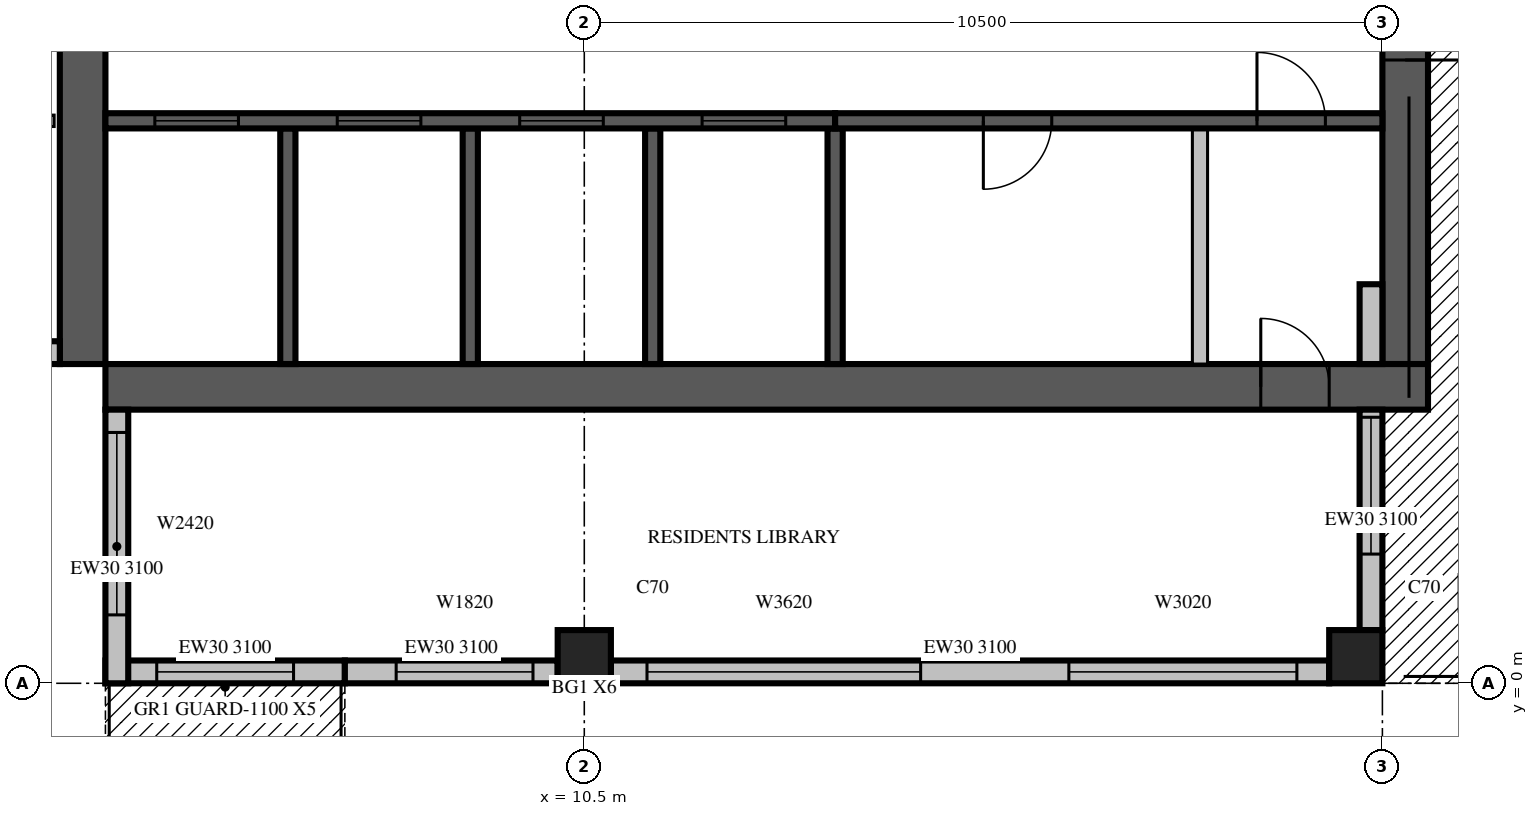
"""IFC4 building model, lengths in metres.
Left out: names, types, materials, properties, quantities, classifications, styles, units other than length and angle.
Written with IfcOpenShell. Run it as: python <this file> out.ifc"""

import sys

from ifc_helpers import new_model, si_unit, direction, frame, frame_2d, origin, origin_2d, place, context, subcontext, project, spatial, rectangle, extrude, source, transform, mapped, element, fill, save


model = new_model("IFC4")
c1 = context("Model", 3, precision=1e-05, world=origin(), true_north=direction((0.0, 1.0)))
c2 = subcontext(c1, "Body", "Model", "MODEL_VIEW")
j1 = project(units=[si_unit("LENGTHUNIT", "METRE"), si_unit("PLANEANGLEUNIT", "RADIAN")], contexts=[c1])
p1 = place(None, origin())
s1 = spatial("IfcSite", under=j1, at=p1, CompositionType="ELEMENT")
p2 = place(p1, origin())
s2 = spatial("IfcBuilding", under=s1, at=p2, CompositionType="ELEMENT")
p3 = place(p2, frame((0.0, 0.0, 291.5)))
s3 = spatial("IfcBuildingStorey", under=s2, at=p3, CompositionType="ELEMENT", Elevation=291.5)
m1 = source(origin(), c2, "Body", "SweptSolid", [
    extrude(rectangle(XDim=0.7, YDim=0.7, at=origin_2d()), origin(), (0.0, 0.0, 1.0), 3.5),
])
for number, where, z_axis, x_axis in (
    (1, (10.5, 0.35, 0.0), (0.0, 0.0, 1.0), (1.0, 0.0, 0.0)),
    (2, (20.65, 0.35, 0.0), (0.0, 0.0, 1.0), (1.0, 0.0, 0.0)),
):
    element("IfcColumn", number, at=place(p3, frame(where, z_axis=z_axis, x_axis=x_axis)), inside=s3, PredefinedType="COLUMN", context=c2, shape_type="MappedRepresentation", body=[
        mapped(m1, transform((0.0, 0.0, 0.0), scale=1.0)),
    ])
m2 = source(origin(), c2, "Body", "SweptSolid", [
    extrude(rectangle(XDim=17.4, YDim=0.6, at=frame_2d((8.7, 0.0))), origin(), (0.0, 0.0, 1.0), 3.5),
])
p4 = place(p3, frame((3.9, 4.2, 0.0), z_axis=(0.0, 0.0, 1.0), x_axis=(0.0, 1.0, 0.0)))
e3 = element("IfcWall", 3, at=p4, inside=s3, PredefinedType="SHEAR", context=c2, shape_type="MappedRepresentation", body=[
    mapped(m2, transform((0.0, 0.0, 0.0), scale=1.0)),
])
m3 = source(origin(), c2, "Body", "SweptSolid", [
    extrude(rectangle(XDim=2.2, YDim=2.1, at=frame_2d((1.1, 1.05))), frame((0.0, 0.31, 0.0), z_axis=(0.0, -1.0, 0.0), x_axis=(1.0, 0.0, 0.0)), (0.0, 0.0, 1.0), 0.62),
])
p5 = place(p4, frame((4.2, 0.0, 0.0)))
e4 = element("IfcOpeningElement", 4, at=p5, cuts=e3, PredefinedType="OPENING", context=c2, shape_type="MappedRepresentation", body=[
    mapped(m3, transform((0.0, 0.0, 0.0), scale=1.0)),
])
m4 = source(origin(), c2, "Body", "SweptSolid", [
    extrude(rectangle(XDim=0.9, YDim=2.1, at=frame_2d((0.45, 1.05))), frame((0.0, 0.31, 0.0), z_axis=(0.0, -1.0, 0.0), x_axis=(1.0, 0.0, 0.0)), (0.0, 0.0, 1.0), 0.62),
])
p6 = place(p4, frame((10.95, 0.0, 0.0)))
e5 = element("IfcOpeningElement", 5, at=p6, cuts=e3, PredefinedType="OPENING", context=c2, shape_type="MappedRepresentation", body=[
    mapped(m4, transform((0.0, 0.0, 0.0), scale=1.0)),
])
m5 = source(origin(), c2, "Body", "SweptSolid", [
    extrude(rectangle(XDim=6.3, YDim=0.6, at=frame_2d((3.15, 0.0))), origin(), (0.0, 0.0, 1.0), 3.5),
])
p7 = place(p3, frame((21.3, 4.2, 0.0), z_axis=(0.0, 0.0, 1.0), x_axis=(0.0, 1.0, 0.0)))
e6 = element("IfcWall", 6, at=p7, inside=s3, PredefinedType="SHEAR", context=c2, shape_type="MappedRepresentation", body=[
    mapped(m5, transform((0.0, 0.0, 0.0), scale=1.0)),
])
p8 = place(p7, frame((4.0, 0.0, 0.0)))
e7 = element("IfcOpeningElement", 7, at=p8, cuts=e6, PredefinedType="OPENING", context=c2, shape_type="MappedRepresentation", body=[
    mapped(m3, transform((0.0, 0.0, 0.0), scale=1.0)),
])
p9 = place(p3, frame((4.2, 3.9, 0.0), z_axis=(0.0, 0.0, 1.0), x_axis=(1.0, 0.0, 0.0)))
e8 = element("IfcWall", 8, at=p9, inside=s3, PredefinedType="SHEAR", context=c2, shape_type="MappedRepresentation", body=[
    mapped(m2, transform((0.0, 0.0, 0.0), scale=1.0)),
])
p10 = place(p9, frame((15.2, 0.0, 0.0)))
e9 = element("IfcOpeningElement", 9, at=p10, cuts=e8, PredefinedType="OPENING", context=c2, shape_type="MappedRepresentation", body=[
    mapped(m4, transform((0.0, 0.0, 0.0), scale=1.0)),
])
m6 = source(origin(), c2, "Body", "SweptSolid", [
    extrude(rectangle(XDim=3.15, YDim=0.3, at=frame_2d((1.575, 0.0))), origin(), (0.0, 0.0, 1.0), 3.1),
])
p11 = place(p3, frame((4.2, 0.15, 0.0), z_axis=(0.0, 0.0, 1.0), x_axis=(1.0, 0.0, 0.0)))
e10 = element("IfcWall", 10, at=p11, inside=s3, PredefinedType="STANDARD", context=c2, shape_type="MappedRepresentation", body=[
    mapped(m6, transform((0.0, 0.0, 0.0), scale=1.0)),
])
m7 = source(origin(), c2, "Body", "SweptSolid", [
    extrude(rectangle(XDim=1.8, YDim=2.4, at=frame_2d((0.9, 1.2))), frame((0.0, 0.16, 0.0), z_axis=(0.0, -1.0, 0.0), x_axis=(1.0, 0.0, 0.0)), (0.0, 0.0, 1.0), 0.32),
])
p12 = place(p11, frame((0.675, 0.0, 0.0)))
e11 = element("IfcOpeningElement", 11, at=p12, cuts=e10, PredefinedType="OPENING", context=c2, shape_type="MappedRepresentation", body=[
    mapped(m7, transform((0.0, 0.0, 0.0), scale=1.0)),
])
m8 = source(origin(), c2, "Body", "SweptSolid", [
    extrude(rectangle(XDim=2.8, YDim=0.3, at=frame_2d((1.4, 0.0))), origin(), (0.0, 0.0, 1.0), 3.1),
])
p13 = place(p3, frame((7.35, 0.15, 0.0), z_axis=(0.0, 0.0, 1.0), x_axis=(1.0, 0.0, 0.0)))
e12 = element("IfcWall", 12, at=p13, inside=s3, PredefinedType="STANDARD", context=c2, shape_type="MappedRepresentation", body=[
    mapped(m8, transform((0.0, 0.0, 0.0), scale=1.0)),
])
m9 = source(origin(), c2, "Body", "SweptSolid", [
    extrude(rectangle(XDim=1.8, YDim=2.0, at=frame_2d((0.9, 1.0))), frame((0.0, 0.16, 0.0), z_axis=(0.0, -1.0, 0.0), x_axis=(1.0, 0.0, 0.0)), (0.0, 0.0, 1.0), 0.32),
])
p14 = place(p13, frame((0.675, 0.0, 0.6)))
e13 = element("IfcOpeningElement", 13, at=p14, cuts=e12, PredefinedType="OPENING", context=c2, shape_type="MappedRepresentation", body=[
    mapped(m9, transform((0.0, 0.0, 0.0), scale=1.0)),
])
m10 = source(origin(), c2, "Body", "SweptSolid", [
    extrude(rectangle(XDim=9.45, YDim=0.3, at=frame_2d((4.725, 0.0))), origin(), (0.0, 0.0, 1.0), 3.1),
])
p15 = place(p3, frame((10.85, 0.15, 0.0), z_axis=(0.0, 0.0, 1.0), x_axis=(1.0, 0.0, 0.0)))
e14 = element("IfcWall", 14, at=p15, inside=s3, PredefinedType="STANDARD", context=c2, shape_type="MappedRepresentation", body=[
    mapped(m10, transform((0.0, 0.0, 0.0), scale=1.0)),
])
m11 = source(origin(), c2, "Body", "SweptSolid", [
    extrude(rectangle(XDim=3.6, YDim=2.0, at=frame_2d((1.8, 1.0))), frame((0.0, 0.16, 0.0), z_axis=(0.0, -1.0, 0.0), x_axis=(1.0, 0.0, 0.0)), (0.0, 0.0, 1.0), 0.32),
])
p16 = place(p15, frame((0.475, 0.0, 0.6)))
e15 = element("IfcOpeningElement", 15, at=p16, cuts=e14, PredefinedType="OPENING", context=c2, shape_type="MappedRepresentation", body=[
    mapped(m11, transform((0.0, 0.0, 0.0), scale=1.0)),
])
m12 = source(origin(), c2, "Body", "SweptSolid", [
    extrude(rectangle(XDim=3.0, YDim=2.0, at=frame_2d((1.5, 1.0))), frame((0.0, 0.16, 0.0), z_axis=(0.0, -1.0, 0.0), x_axis=(1.0, 0.0, 0.0)), (0.0, 0.0, 1.0), 0.32),
])
p17 = place(p15, frame((6.025, 0.0, 0.6)))
e16 = element("IfcOpeningElement", 16, at=p17, cuts=e14, PredefinedType="OPENING", context=c2, shape_type="MappedRepresentation", body=[
    mapped(m12, transform((0.0, 0.0, 0.0), scale=1.0)),
])
m13 = source(origin(), c2, "Body", "SweptSolid", [
    extrude(rectangle(XDim=2.9, YDim=0.3, at=frame_2d((1.45, 0.0))), origin(), (0.0, 0.0, 1.0), 3.1),
])
p18 = place(p3, frame((20.85, 0.7, 0.0), z_axis=(0.0, 0.0, 1.0), x_axis=(0.0, 1.0, 0.0)))
e17 = element("IfcWall", 17, at=p18, inside=s3, PredefinedType="STANDARD", context=c2, shape_type="MappedRepresentation", body=[
    mapped(m13, transform((0.0, 0.0, 0.0), scale=1.0)),
])
p19 = place(p18, frame((1.0, 0.0, 0.0)))
e18 = element("IfcOpeningElement", 18, at=p19, cuts=e17, PredefinedType="OPENING", context=c2, shape_type="MappedRepresentation", body=[
    mapped(m7, transform((0.0, 0.0, 0.0), scale=1.0)),
])
p20 = place(p3, frame((20.85, 4.2, 0.0), z_axis=(0.0, 0.0, 1.0), x_axis=(0.0, 1.0, 0.0)))
e19 = element("IfcWall", 19, at=p20, inside=s3, PredefinedType="STANDARD", context=c2, shape_type="SweptSolid", body=[
    extrude(rectangle(XDim=1.05, YDim=0.3, at=frame_2d((0.525, 0.0))), origin(), (0.0, 0.0, 1.0), 3.1),
])
m14 = source(origin(), c2, "Body", "SweptSolid", [
    extrude(rectangle(XDim=3.6, YDim=0.3, at=frame_2d((1.8, 0.0))), origin(), (0.0, 0.0, 1.0), 3.1),
])
p21 = place(p3, frame((0.0, 4.35, 0.0), z_axis=(0.0, 0.0, 1.0), x_axis=(1.0, 0.0, 0.0)))
e20 = element("IfcWall", 20, at=p21, inside=s3, PredefinedType="STANDARD", context=c2, shape_type="MappedRepresentation", body=[
    mapped(m14, transform((0.0, 0.0, 0.0), scale=1.0)),
])
m15 = source(origin(), c2, "Body", "SweptSolid", [
    extrude(rectangle(XDim=2.4, YDim=2.0, at=frame_2d((1.2, 1.0))), frame((0.0, 0.16, 0.0), z_axis=(0.0, -1.0, 0.0), x_axis=(1.0, 0.0, 0.0)), (0.0, 0.0, 1.0), 0.32),
])
p22 = place(p21, frame((0.9, 0.0, 0.6)))
e21 = element("IfcOpeningElement", 21, at=p22, cuts=e20, PredefinedType="OPENING", context=c2, shape_type="MappedRepresentation", body=[
    mapped(m15, transform((0.0, 0.0, 0.0), scale=1.0)),
])
p23 = place(p3, frame((4.35, 3.6, 0.0), z_axis=(0.0, 0.0, 1.0), x_axis=(0.0, -1.0, 0.0)))
e22 = element("IfcWall", 22, at=p23, inside=s3, PredefinedType="STANDARD", context=c2, shape_type="MappedRepresentation", body=[
    mapped(m14, transform((0.0, 0.0, 0.0), scale=1.0)),
])
p24 = place(p23, frame((0.3, 0.0, 0.6)))
e23 = element("IfcOpeningElement", 23, at=p24, cuts=e22, PredefinedType="OPENING", context=c2, shape_type="MappedRepresentation", body=[
    mapped(m15, transform((0.0, 0.0, 0.0), scale=1.0)),
])
m16 = source(origin(), c2, "Body", "SweptSolid", [
    extrude(rectangle(XDim=3.1, YDim=0.2, at=frame_2d((1.55, 0.0))), origin(), (0.0, 0.0, 1.0), 3.5),
])
for number, where, z_axis, x_axis in (
    (24, (6.6, 4.2, 0.0), (0.0, 0.0, 1.0), (0.0, 1.0, 0.0)),
    (25, (9.0, 4.2, 0.0), (0.0, 0.0, 1.0), (0.0, 1.0, 0.0)),
    (26, (11.4, 4.2, 0.0), (0.0, 0.0, 1.0), (0.0, 1.0, 0.0)),
):
    element("IfcWall", number, at=place(p3, frame(where, z_axis=z_axis, x_axis=x_axis)), inside=s3, PredefinedType="SOLIDWALL", context=c2, shape_type="MappedRepresentation", body=[
        mapped(m16, transform((0.0, 0.0, 0.0), scale=1.0)),
    ])
m17 = source(origin(), c2, "Body", "SweptSolid", [
    extrude(rectangle(XDim=3.1, YDim=0.2, at=frame_2d((1.55, 0.0))), origin(), (0.0, 0.0, 1.0), 3.1),
])
p25 = place(p3, frame((13.8, 4.2, 0.0), z_axis=(0.0, 0.0, 1.0), x_axis=(0.0, 1.0, 0.0)))
e27 = element("IfcWall", 27, at=p25, inside=s3, PredefinedType="SOLIDWALL", context=c2, shape_type="MappedRepresentation", body=[
    mapped(m17, transform((0.0, 0.0, 0.0), scale=1.0)),
])
m18 = source(origin(), c2, "Body", "SweptSolid", [
    extrude(rectangle(XDim=3.1, YDim=0.2, at=frame_2d((1.55, 0.0))), origin(), (0.0, 0.0, 1.0), 3.1),
])
p26 = place(p3, frame((18.6, 4.2, 0.0), z_axis=(0.0, 0.0, 1.0), x_axis=(0.0, 1.0, 0.0)))
e28 = element("IfcWall", 28, at=p26, inside=s3, PredefinedType="PARTITIONING", context=c2, shape_type="MappedRepresentation", body=[
    mapped(m18, transform((0.0, 0.0, 0.0), scale=1.0)),
])
m19 = source(origin(), c2, "Body", "SweptSolid", [
    extrude(rectangle(XDim=9.6, YDim=0.2, at=frame_2d((4.8, 0.0))), origin(), (0.0, 0.0, 1.0), 3.5),
])
p27 = place(p3, frame((4.2, 7.4, 0.0), z_axis=(0.0, 0.0, 1.0), x_axis=(1.0, 0.0, 0.0)))
e29 = element("IfcWall", 29, at=p27, inside=s3, PredefinedType="SOLIDWALL", context=c2, shape_type="MappedRepresentation", body=[
    mapped(m19, transform((0.0, 0.0, 0.0), scale=1.0)),
])
m20 = source(origin(), c2, "Body", "SweptSolid", [
    extrude(rectangle(XDim=1.1, YDim=2.1, at=frame_2d((0.55, 1.05))), frame((0.0, 0.11, 0.0), z_axis=(0.0, -1.0, 0.0), x_axis=(1.0, 0.0, 0.0)), (0.0, 0.0, 1.0), 0.22),
])
p28 = place(p27, frame((0.65, 0.0, 0.0)))
e30 = element("IfcOpeningElement", 30, at=p28, cuts=e29, PredefinedType="OPENING", context=c2, shape_type="MappedRepresentation", body=[
    mapped(m20, transform((0.0, 0.0, 0.0), scale=1.0)),
])
p29 = place(p27, frame((3.05, 0.0, 0.0)))
e31 = element("IfcOpeningElement", 31, at=p29, cuts=e29, PredefinedType="OPENING", context=c2, shape_type="MappedRepresentation", body=[
    mapped(m20, transform((0.0, 0.0, 0.0), scale=1.0)),
])
p30 = place(p27, frame((5.45, 0.0, 0.0)))
e32 = element("IfcOpeningElement", 32, at=p30, cuts=e29, PredefinedType="OPENING", context=c2, shape_type="MappedRepresentation", body=[
    mapped(m20, transform((0.0, 0.0, 0.0), scale=1.0)),
])
p31 = place(p27, frame((7.85, 0.0, 0.0)))
e33 = element("IfcOpeningElement", 33, at=p31, cuts=e29, PredefinedType="OPENING", context=c2, shape_type="MappedRepresentation", body=[
    mapped(m20, transform((0.0, 0.0, 0.0), scale=1.0)),
])
m21 = source(origin(), c2, "Body", "SweptSolid", [
    extrude(rectangle(XDim=7.2, YDim=0.2, at=frame_2d((3.6, 0.0))), origin(), (0.0, 0.0, 1.0), 3.1),
])
p32 = place(p3, frame((13.8, 7.4, 0.0), z_axis=(0.0, 0.0, 1.0), x_axis=(1.0, 0.0, 0.0)))
e34 = element("IfcWall", 34, at=p32, inside=s3, PredefinedType="SOLIDWALL", context=c2, shape_type="MappedRepresentation", body=[
    mapped(m21, transform((0.0, 0.0, 0.0), scale=1.0)),
])
m22 = source(origin(), c2, "Body", "SweptSolid", [
    extrude(rectangle(XDim=0.9, YDim=2.1, at=frame_2d((0.45, 1.05))), frame((0.0, 0.11, 0.0), z_axis=(0.0, -1.0, 0.0), x_axis=(1.0, 0.0, 0.0)), (0.0, 0.0, 1.0), 0.22),
])
p33 = place(p32, frame((1.95, 0.0, 0.0)))
e35 = element("IfcOpeningElement", 35, at=p33, cuts=e34, PredefinedType="OPENING", context=c2, shape_type="MappedRepresentation", body=[
    mapped(m22, transform((0.0, 0.0, 0.0), scale=1.0)),
])
p34 = place(p32, frame((5.55, 0.0, 0.0)))
e36 = element("IfcOpeningElement", 36, at=p34, cuts=e34, PredefinedType="OPENING", context=c2, shape_type="MappedRepresentation", body=[
    mapped(m22, transform((0.0, 0.0, 0.0), scale=1.0)),
])
m23 = source(origin(), c2, "Body", "SweptSolid", [
    extrude(rectangle(XDim=3.225, YDim=0.15, at=frame_2d((1.613, 0.0))), origin(), (0.0, 0.0, 1.0), 3.1),
])
p35 = place(p3, frame((0.3, 7.4, 0.0), z_axis=(0.0, 0.0, 1.0), x_axis=(1.0, 0.0, 0.0)))
e37 = element("IfcWall", 37, at=p35, inside=s3, PredefinedType="PARTITIONING", context=c2, shape_type="MappedRepresentation", body=[
    mapped(m23, transform((0.0, 0.0, 0.0), scale=1.0)),
])
m24 = source(origin(), c2, "Body", "SweptSolid", [
    extrude(rectangle(XDim=0.9, YDim=2.1, at=frame_2d((0.45, 1.05))), frame((0.0, 0.085, 0.0), z_axis=(0.0, -1.0, 0.0), x_axis=(1.0, 0.0, 0.0)), (0.0, 0.0, 1.0), 0.17),
])
p36 = place(p35, frame((1.2, 0.0, 0.0)))
e38 = element("IfcOpeningElement", 38, at=p36, cuts=e37, PredefinedType="OPENING", context=c2, shape_type="MappedRepresentation", body=[
    mapped(m24, transform((0.0, 0.0, 0.0), scale=1.0)),
])
m25 = source(origin(), c2, "Body", "SweptSolid", [
    extrude(rectangle(XDim=1.8, YDim=2.4, at=frame_2d((0.9, 1.2))), frame((0.0, 0.025, 0.0), z_axis=(0.0, -1.0, 0.0), x_axis=(1.0, 0.0, 0.0)), (0.0, 0.0, 1.0), 0.05),
])
p37 = place(p12, origin())
e39 = element("IfcDoor", 39, at=p37, inside=s3, OperationType="SLIDING_TO_LEFT", PredefinedType="DOOR", context=c2, shape_type="MappedRepresentation", body=[
    mapped(m25, transform((0.0, 0.0, 0.0), scale=1.0)),
])
fill(e11, e39)
m26 = source(origin(), c2, "Body", "SweptSolid", [
    extrude(rectangle(XDim=1.8, YDim=2.0, at=frame_2d((0.9, 1.0))), frame((0.0, 0.03, 0.0), z_axis=(0.0, -1.0, 0.0), x_axis=(1.0, 0.0, 0.0)), (0.0, 0.0, 1.0), 0.06),
])
p38 = place(p14, origin())
e40 = element("IfcWindow", 40, at=p38, inside=s3, PartitioningType="SINGLE_PANEL", PredefinedType="WINDOW", context=c2, shape_type="MappedRepresentation", body=[
    mapped(m26, transform((0.0, 0.0, 0.0), scale=1.0)),
])
fill(e13, e40)
m27 = source(origin(), c2, "Body", "SweptSolid", [
    extrude(rectangle(XDim=3.6, YDim=2.0, at=frame_2d((1.8, 1.0))), frame((0.0, 0.03, 0.0), z_axis=(0.0, -1.0, 0.0), x_axis=(1.0, 0.0, 0.0)), (0.0, 0.0, 1.0), 0.06),
])
p39 = place(p16, origin())
e41 = element("IfcWindow", 41, at=p39, inside=s3, PartitioningType="SINGLE_PANEL", PredefinedType="WINDOW", context=c2, shape_type="MappedRepresentation", body=[
    mapped(m27, transform((0.0, 0.0, 0.0), scale=1.0)),
])
fill(e15, e41)
m28 = source(origin(), c2, "Body", "SweptSolid", [
    extrude(rectangle(XDim=3.0, YDim=2.0, at=frame_2d((1.5, 1.0))), frame((0.0, 0.03, 0.0), z_axis=(0.0, -1.0, 0.0), x_axis=(1.0, 0.0, 0.0)), (0.0, 0.0, 1.0), 0.06),
])
p40 = place(p17, origin())
e42 = element("IfcWindow", 42, at=p40, inside=s3, PartitioningType="SINGLE_PANEL", PredefinedType="WINDOW", context=c2, shape_type="MappedRepresentation", body=[
    mapped(m28, transform((0.0, 0.0, 0.0), scale=1.0)),
])
fill(e16, e42)
p41 = place(p19, origin())
e43 = element("IfcDoor", 43, at=p41, inside=s3, OperationType="SLIDING_TO_LEFT", PredefinedType="DOOR", context=c2, shape_type="MappedRepresentation", body=[
    mapped(m25, transform((0.0, 0.0, 0.0), scale=1.0)),
])
fill(e18, e43)
m29 = source(origin(), c2, "Body", "SweptSolid", [
    extrude(rectangle(XDim=2.4, YDim=2.0, at=frame_2d((1.2, 1.0))), frame((0.0, 0.03, 0.0), z_axis=(0.0, -1.0, 0.0), x_axis=(1.0, 0.0, 0.0)), (0.0, 0.0, 1.0), 0.06),
])
p42 = place(p24, origin())
e44 = element("IfcWindow", 44, at=p42, inside=s3, PartitioningType="SINGLE_PANEL", PredefinedType="WINDOW", context=c2, shape_type="MappedRepresentation", body=[
    mapped(m29, transform((0.0, 0.0, 0.0), scale=1.0)),
])
fill(e23, e44)
m30 = source(origin(), c2, "Body", "SweptSolid", [
    extrude(rectangle(XDim=1.1, YDim=2.1, at=frame_2d((0.55, 1.05))), frame((0.0, 0.025, 0.0), z_axis=(0.0, -1.0, 0.0), x_axis=(1.0, 0.0, 0.0)), (0.0, 0.0, 1.0), 0.05),
])
p43 = place(p28, origin())
e45 = element("IfcDoor", 45, at=p43, inside=s3, OperationType="SLIDING_TO_LEFT", PredefinedType="DOOR", context=c2, shape_type="MappedRepresentation", body=[
    mapped(m30, transform((0.0, 0.0, 0.0), scale=1.0)),
])
fill(e30, e45)
p44 = place(p29, origin())
e46 = element("IfcDoor", 46, at=p44, inside=s3, OperationType="SLIDING_TO_LEFT", PredefinedType="DOOR", context=c2, shape_type="MappedRepresentation", body=[
    mapped(m30, transform((0.0, 0.0, 0.0), scale=1.0)),
])
fill(e31, e46)
p45 = place(p30, origin())
e47 = element("IfcDoor", 47, at=p45, inside=s3, OperationType="SLIDING_TO_LEFT", PredefinedType="DOOR", context=c2, shape_type="MappedRepresentation", body=[
    mapped(m30, transform((0.0, 0.0, 0.0), scale=1.0)),
])
fill(e32, e47)
p46 = place(p31, origin())
e48 = element("IfcDoor", 48, at=p46, inside=s3, OperationType="SLIDING_TO_LEFT", PredefinedType="DOOR", context=c2, shape_type="MappedRepresentation", body=[
    mapped(m30, transform((0.0, 0.0, 0.0), scale=1.0)),
])
fill(e33, e48)
m31 = source(origin(), c2, "Body", "SweptSolid", [
    extrude(rectangle(XDim=0.9, YDim=2.1, at=frame_2d((0.45, 1.05))), frame((0.0, 0.025, 0.0), z_axis=(0.0, -1.0, 0.0), x_axis=(1.0, 0.0, 0.0)), (0.0, 0.0, 1.0), 0.05),
])
p47 = place(p33, origin())
e49 = element("IfcDoor", 49, at=p47, inside=s3, OperationType="SINGLE_SWING_RIGHT", PredefinedType="DOOR", context=c2, shape_type="MappedRepresentation", body=[
    mapped(m31, transform((0.0, 0.0, 0.0), scale=1.0)),
])
fill(e35, e49)
p48 = place(p34, origin())
e50 = element("IfcDoor", 50, at=p48, inside=s3, OperationType="SINGLE_SWING_LEFT", PredefinedType="DOOR", context=c2, shape_type="MappedRepresentation", body=[
    mapped(m31, transform((0.0, 0.0, 0.0), scale=1.0)),
])
fill(e36, e50)
m32 = source(origin(), c2, "Body", "SweptSolid", [
    extrude(rectangle(XDim=2.2, YDim=2.1, at=frame_2d((1.1, 1.05))), frame((0.0, 0.025, 0.0), z_axis=(0.0, -1.0, 0.0), x_axis=(1.0, 0.0, 0.0)), (0.0, 0.0, 1.0), 0.05),
])
p49 = place(p8, origin())
e51 = element("IfcDoor", 51, at=p49, inside=s3, OperationType="DOUBLE_DOOR_SINGLE_SWING", PredefinedType="DOOR", context=c2, shape_type="MappedRepresentation", body=[
    mapped(m32, transform((0.0, 0.0, 0.0), scale=1.0)),
])
fill(e7, e51)
p50 = place(p10, origin())
e52 = element("IfcDoor", 52, at=p50, inside=s3, OperationType="SINGLE_SWING_LEFT", PredefinedType="DOOR", context=c2, shape_type="MappedRepresentation", body=[
    mapped(m31, transform((0.0, 0.0, 0.0), scale=1.0)),
])
fill(e9, e52)
save(model, sys.argv[1])
